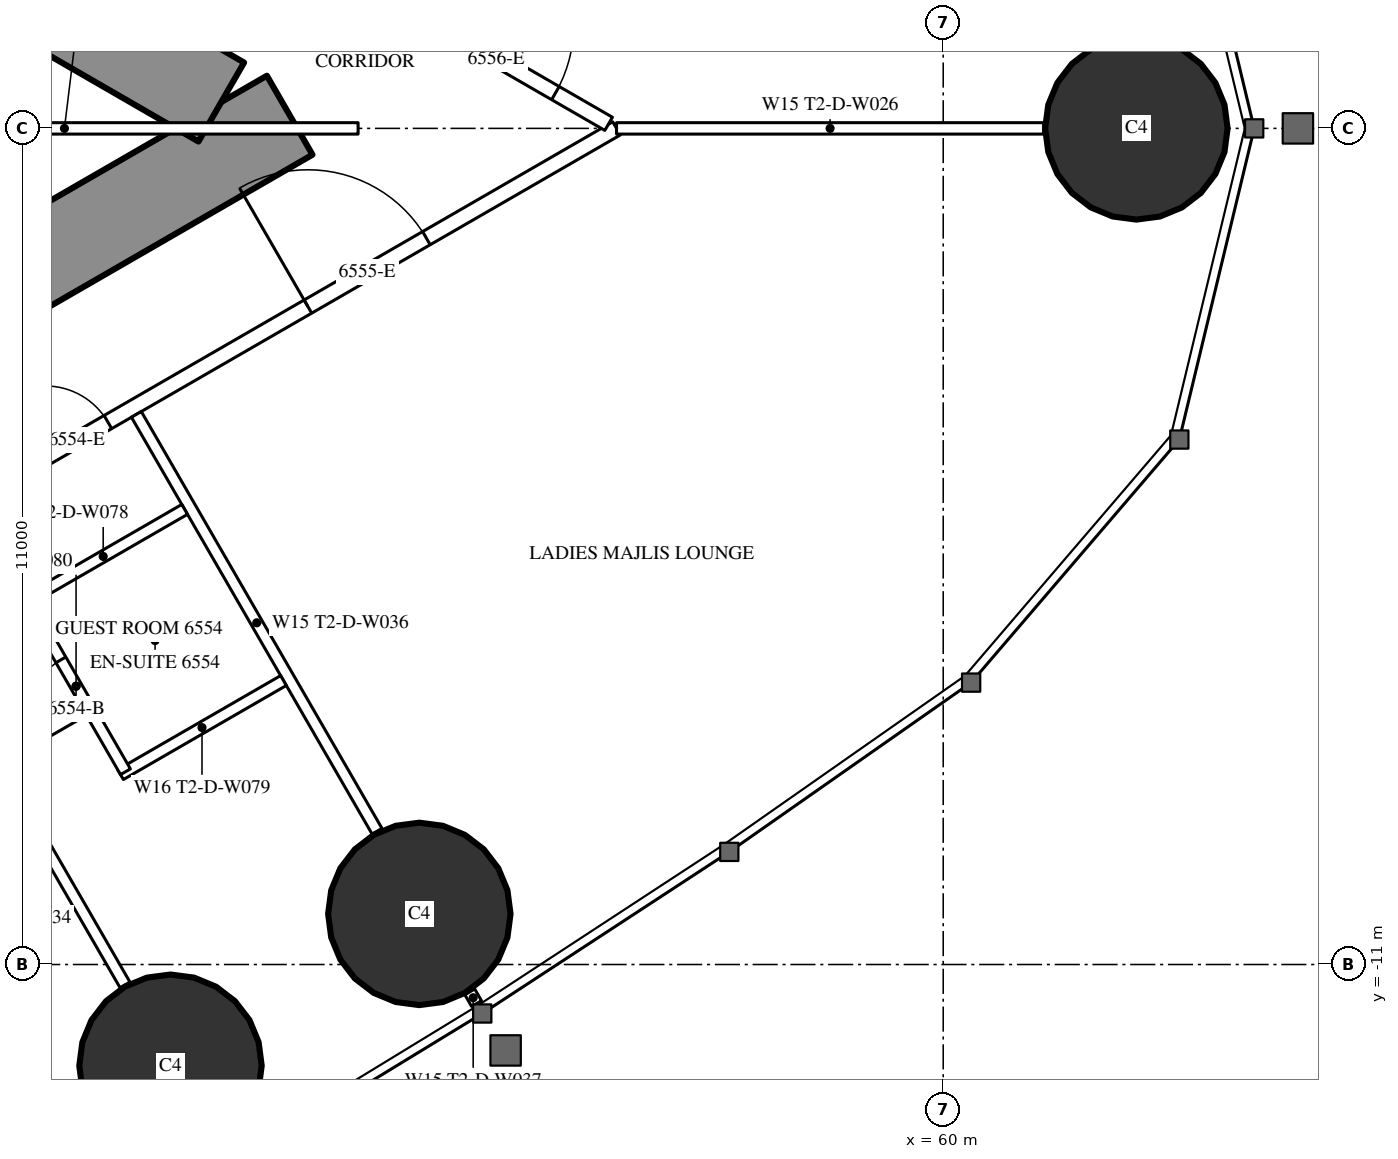
"""IFC4 building model, lengths in metres.
Left out: names, types, materials, properties, quantities, classifications, styles, units other than length and angle.
Written with IfcOpenShell. Run it as: python <this file> out.ifc"""

import sys

from ifc_helpers import new_model, si_unit, direction, frame, frame_2d, origin, origin_2d, place, context, subcontext, project, spatial, rectangle, circle, extrude, element, fill, save


model = new_model("IFC4")
c1 = context("Model", 3, precision=1e-05, world=origin(), true_north=direction((0.0, 1.0)))
c2 = subcontext(c1, "Body", "Model", "MODEL_VIEW")
j1 = project(units=[si_unit("LENGTHUNIT", "METRE"), si_unit("PLANEANGLEUNIT", "RADIAN")], contexts=[c1])
p1 = place(None, origin())
s1 = spatial("IfcSite", under=j1, at=p1, CompositionType="ELEMENT")
p2 = place(p1, origin())
s2 = spatial("IfcBuilding", under=s1, at=p2, CompositionType="ELEMENT")
p3 = place(p2, frame((0.0, 0.0, 244.1)))
s3 = spatial("IfcBuildingStorey", under=s2, at=p3, CompositionType="ELEMENT", Elevation=244.1)
for number, where, z_axis, x_axis in (
    (1, (62.542, 0.0, 0.0), (0.0, 0.0, 1.0), (1.0, 0.0, 0.0)),
    (2, (49.834, -12.332, 0.0), (0.0, 0.0, 1.0), (1.0, 0.0, 0.0)),
    (3, (53.108, -10.334, 0.0), (0.0, 0.0, 1.0), (1.0, 0.0, 0.0)),
):
    element("IfcColumn", number, at=place(p3, frame(where, z_axis=z_axis, x_axis=x_axis)), inside=s3, PredefinedType="COLUMN", context=c2, shape_type="SweptSolid", body=[
        extrude(circle(Radius=1.2, at=origin_2d()), origin(), (0.0, 0.0, 1.0), 3.6),
    ])
p4 = place(p3, frame((27.2, -13.8, 0.0), z_axis=(0.0, 0.0, 1.0), x_axis=(0.866027159892, 0.499996958321, 0.0)))
e4 = element("IfcWall", 4, at=p4, inside=s3, PredefinedType="SHEAR", context=c2, shape_type="SweptSolid", body=[
    extrude(rectangle(XDim=27.947, YDim=1.2, at=frame_2d((13.973, 0.0))), origin(), (0.0, 0.0, 1.0), 3.6),
])
p5 = place(p4, frame((4.6, 0.0, 0.0)))
e5 = element("IfcOpeningElement", 5, at=p5, cuts=e4, PredefinedType="OPENING", context=c2, shape_type="SweptSolid", body=[
    extrude(rectangle(XDim=1.0, YDim=2.2, at=frame_2d((0.5, 1.1))), frame((0.0, 0.61, 0.0), z_axis=(0.0, -1.0, 0.0), x_axis=(1.0, 0.0, 0.0)), (0.0, 0.0, 1.0), 1.22),
])
p6 = place(p4, frame((13.395, 0.0, 0.0)))
e6 = element("IfcOpeningElement", 6, at=p6, cuts=e4, PredefinedType="OPENING", context=c2, shape_type="SweptSolid", body=[
    extrude(rectangle(XDim=1.8, YDim=2.2, at=frame_2d((0.9, 1.1))), frame((0.0, 0.61, 0.0), z_axis=(0.0, -1.0, 0.0), x_axis=(1.0, 0.0, 0.0)), (0.0, 0.0, 1.0), 1.22),
])
p7 = place(p3, frame((27.2, 13.8, 0.0), z_axis=(0.0, 0.0, 1.0), x_axis=(0.866024515034, -0.500001539357, 0.0)))
e7 = element("IfcWall", 7, at=p7, inside=s3, PredefinedType="SHEAR", context=c2, shape_type="SweptSolid", body=[
    extrude(rectangle(XDim=26.907, YDim=1.2, at=frame_2d((13.454, 0.0))), origin(), (0.0, 0.0, 1.0), 3.6),
])
p8 = place(p7, frame((4.6, 0.0, 0.0)))
e8 = element("IfcOpeningElement", 8, at=p8, cuts=e7, PredefinedType="OPENING", context=c2, shape_type="SweptSolid", body=[
    extrude(rectangle(XDim=1.0, YDim=2.2, at=frame_2d((0.5, 1.1))), frame((0.0, 0.61, 0.0), z_axis=(0.0, -1.0, 0.0), x_axis=(1.0, 0.0, 0.0)), (0.0, 0.0, 1.0), 1.22),
])
p9 = place(p7, frame((13.395, 0.0, 0.0)))
e9 = element("IfcOpeningElement", 9, at=p9, cuts=e7, PredefinedType="OPENING", context=c2, shape_type="SweptSolid", body=[
    extrude(rectangle(XDim=1.8, YDim=2.2, at=frame_2d((0.9, 1.1))), frame((0.0, 0.61, 0.0), z_axis=(0.0, -1.0, 0.0), x_axis=(1.0, 0.0, 0.0)), (0.0, 0.0, 1.0), 1.22),
])
p10 = place(p3, frame((28.959, -15.44, 0.0), z_axis=(0.0, 0.0, 1.0), x_axis=(0.866025227435, 0.500000305447, 0.0)))
e10 = element("IfcWall", 10, at=p10, inside=s3, PredefinedType="PARTITIONING", context=c2, shape_type="SweptSolid", body=[
    extrude(rectangle(XDim=30.88, YDim=0.2, at=frame_2d((15.44, 0.0))), origin(), (0.0, 0.0, 1.0), 3.35),
])
p11 = place(p10, frame((1.494, 0.0, 0.0)))
e11 = element("IfcOpeningElement", 11, at=p11, cuts=e10, PredefinedType="OPENING", context=c2, shape_type="SweptSolid", body=[
    extrude(rectangle(XDim=1.8, YDim=2.04, at=frame_2d((0.9, 1.02))), frame((0.0, 0.11, 0.0), z_axis=(0.0, -1.0, 0.0), x_axis=(1.0, 0.0, 0.0)), (0.0, 0.0, 1.0), 0.22),
])
p12 = place(p10, frame((7.687, 0.0, 0.0)))
e12 = element("IfcOpeningElement", 12, at=p12, cuts=e10, PredefinedType="OPENING", context=c2, shape_type="SweptSolid", body=[
    extrude(rectangle(XDim=1.0, YDim=2.2, at=frame_2d((0.5, 1.1))), frame((0.0, 0.11, 0.0), z_axis=(0.0, -1.0, 0.0), x_axis=(1.0, 0.0, 0.0)), (0.0, 0.0, 1.0), 0.22),
])
p13 = place(p10, frame((18.321, 0.0, 0.0)))
e13 = element("IfcOpeningElement", 13, at=p13, cuts=e10, PredefinedType="OPENING", context=c2, shape_type="SweptSolid", body=[
    extrude(rectangle(XDim=0.95, YDim=2.2, at=frame_2d((0.475, 1.1))), frame((0.0, 0.11, 0.0), z_axis=(0.0, -1.0, 0.0), x_axis=(1.0, 0.0, 0.0)), (0.0, 0.0, 1.0), 0.22),
])
p14 = place(p10, frame((22.203, 0.0, 0.0)))
e14 = element("IfcOpeningElement", 14, at=p14, cuts=e10, PredefinedType="OPENING", context=c2, shape_type="SweptSolid", body=[
    extrude(rectangle(XDim=0.95, YDim=2.2, at=frame_2d((0.475, 1.1))), frame((0.0, 0.11, 0.0), z_axis=(0.0, -1.0, 0.0), x_axis=(1.0, 0.0, 0.0)), (0.0, 0.0, 1.0), 0.22),
])
p15 = place(p10, frame((26.192, 0.0, 0.0)))
e15 = element("IfcOpeningElement", 15, at=p15, cuts=e10, PredefinedType="OPENING", context=c2, shape_type="SweptSolid", body=[
    extrude(rectangle(XDim=1.8, YDim=2.2, at=frame_2d((0.9, 1.1))), frame((0.0, 0.11, 0.0), z_axis=(0.0, -1.0, 0.0), x_axis=(1.0, 0.0, 0.0)), (0.0, 0.0, 1.0), 0.22),
])
p16 = place(p3, frame((46.023, -5.704, 0.0), z_axis=(0.0, 0.0, 1.0), x_axis=(0.499984478165, -0.866034365135, 0.0)))
e16 = element("IfcWall", 16, at=p16, inside=s3, PredefinedType="PARTITIONING", context=c2, shape_type="SweptSolid", body=[
    extrude(rectangle(XDim=6.426, YDim=0.15, at=frame_2d((3.213, 0.0))), origin(), (0.0, 0.0, 1.0), 2.45),
])
p17 = place(p3, frame((49.385, -3.763, 0.0), z_axis=(0.0, 0.0, 1.0), x_axis=(0.499999447814, -0.866025722589, 0.0)))
e17 = element("IfcWall", 17, at=p17, inside=s3, PredefinedType="PARTITIONING", context=c2, shape_type="SweptSolid", body=[
    extrude(rectangle(XDim=6.333, YDim=0.15, at=frame_2d((3.166, 0.0))), origin(), (0.0, 0.0, 1.0), 2.45),
])
p18 = place(p3, frame((53.771, -11.36, 0.0), z_axis=(0.0, 0.0, 1.0), x_axis=(0.499524978789, -0.866299483762, 0.0)))
e18 = element("IfcWall", 18, at=p18, inside=s3, PredefinedType="PARTITIONING", context=c2, shape_type="SweptSolid", body=[
    extrude(rectangle(XDim=0.178, YDim=0.15, at=frame_2d((0.089, 0.0))), origin(), (0.0, 0.0, 1.0), 2.45),
])
p19 = place(p3, frame((55.702, 0.0, 0.0), z_axis=(0.0, 0.0, 1.0), x_axis=(1.0, 0.0, 0.0)))
e19 = element("IfcWall", 19, at=p19, inside=s3, PredefinedType="PARTITIONING", context=c2, shape_type="SweptSolid", body=[
    extrude(rectangle(XDim=5.619, YDim=0.15, at=frame_2d((2.81, 0.0))), origin(), (0.0, 0.0, 1.0), 2.45),
])
p20 = place(p3, frame((52.639, 1.769, 0.0), z_axis=(0.0, 0.0, 1.0), x_axis=(0.866027340901, -0.4999966448, 0.0)))
e20 = element("IfcWall", 20, at=p20, inside=s3, PredefinedType="PARTITIONING", context=c2, shape_type="SweptSolid", body=[
    extrude(rectangle(XDim=3.417, YDim=0.2, at=frame_2d((1.708, 0.0))), origin(), (0.0, 0.0, 1.0), 3.35),
])
p21 = place(p20, frame((0.809, 0.0, 0.0)))
e21 = element("IfcOpeningElement", 21, at=p21, cuts=e20, PredefinedType="OPENING", context=c2, shape_type="SweptSolid", body=[
    extrude(rectangle(XDim=1.8, YDim=2.2, at=frame_2d((0.9, 1.1))), frame((0.0, 0.11, 0.0), z_axis=(0.0, -1.0, 0.0), x_axis=(1.0, 0.0, 0.0)), (0.0, 0.0, 1.0), 0.22),
])
p22 = place(p3, frame((49.177, -8.502, 0.0), z_axis=(0.0, 0.0, 1.0), x_axis=(0.866031185235, 0.4999899861, 0.0)))
e22 = element("IfcWall", 22, at=p22, inside=s3, PredefinedType="PARTITIONING", context=c2, shape_type="SweptSolid", body=[
    extrude(rectangle(XDim=2.475, YDim=0.15, at=frame_2d((1.238, 0.0))), origin(), (0.0, 0.0, 1.0), 3.35),
])
p23 = place(p3, frame((47.942, -6.213, 0.0), z_axis=(0.0, 0.0, 1.0), x_axis=(0.500047596559, -0.865997922154, 0.0)))
e23 = element("IfcWall", 23, at=p23, inside=s3, PredefinedType="PARTITIONING", context=c2, shape_type="SweptSolid", body=[
    extrude(rectangle(XDim=2.6, YDim=0.15, at=frame_2d((1.3, 0.0))), origin(), (0.0, 0.0, 1.0), 3.35),
])
p24 = place(p23, frame((0.9, 0.0, 0.0)))
e24 = element("IfcOpeningElement", 24, at=p24, cuts=e23, PredefinedType="OPENING", context=c2, shape_type="SweptSolid", body=[
    extrude(rectangle(XDim=0.8, YDim=2.2, at=frame_2d((0.4, 1.1))), frame((0.0, 0.085, 0.0), z_axis=(0.0, -1.0, 0.0), x_axis=(1.0, 0.0, 0.0)), (0.0, 0.0, 1.0), 0.17),
])
p25 = place(p3, frame((47.877, -6.25, 0.0), z_axis=(0.0, 0.0, 1.0), x_axis=(0.866031185235, 0.4999899861, 0.0)))
e25 = element("IfcWall", 25, at=p25, inside=s3, PredefinedType="PARTITIONING", context=c2, shape_type="SweptSolid", body=[
    extrude(rectangle(XDim=2.475, YDim=0.15, at=frame_2d((1.238, 0.0))), origin(), (0.0, 0.0, 1.0), 3.35),
])
p26 = place(p3, frame((44.575, 0.0, 0.0), z_axis=(0.0, 0.0, 1.0), x_axis=(1.0, 0.0, 0.0)))
e26 = element("IfcWall", 26, at=p26, inside=s3, PredefinedType="PARTITIONING", context=c2, shape_type="SweptSolid", body=[
    extrude(rectangle(XDim=7.727, YDim=0.15, at=frame_2d((3.864, 0.0))), origin(), (0.0, 0.0, 1.0), 2.45),
])
p27 = place(p24, origin())
e27 = element("IfcDoor", 27, at=p27, inside=s3, OperationType="SINGLE_SWING_RIGHT", PredefinedType="DOOR", context=c2, shape_type="SweptSolid", body=[
    extrude(rectangle(XDim=0.8, YDim=2.2, at=frame_2d((0.4, 1.1))), frame((0.0, 0.025, 0.0), z_axis=(0.0, -1.0, 0.0), x_axis=(1.0, 0.0, 0.0)), (0.0, 0.0, 1.0), 0.05),
])
fill(e24, e27)
p28 = place(p14, origin())
e28 = element("IfcDoor", 28, at=p28, inside=s3, OperationType="SINGLE_SWING_LEFT", PredefinedType="DOOR", context=c2, shape_type="SweptSolid", body=[
    extrude(rectangle(XDim=0.95, YDim=2.2, at=frame_2d((0.475, 1.1))), frame((0.0, 0.025, 0.0), z_axis=(0.0, -1.0, 0.0), x_axis=(1.0, 0.0, 0.0)), (0.0, 0.0, 1.0), 0.05),
])
fill(e14, e28)
p29 = place(p15, origin())
e29 = element("IfcDoor", 29, at=p29, inside=s3, OperationType="DOUBLE_DOOR_SINGLE_SWING", PredefinedType="DOOR", context=c2, shape_type="SweptSolid", body=[
    extrude(rectangle(XDim=1.8, YDim=2.2, at=frame_2d((0.9, 1.1))), frame((0.0, 0.025, 0.0), z_axis=(0.0, -1.0, 0.0), x_axis=(1.0, 0.0, 0.0)), (0.0, 0.0, 1.0), 0.05),
])
fill(e15, e29)
p30 = place(p21, origin())
e30 = element("IfcDoor", 30, at=p30, inside=s3, OperationType="DOUBLE_DOOR_SINGLE_SWING", PredefinedType="DOOR", context=c2, shape_type="SweptSolid", body=[
    extrude(rectangle(XDim=1.8, YDim=2.2, at=frame_2d((0.9, 1.1))), frame((0.0, 0.025, 0.0), z_axis=(0.0, -1.0, 0.0), x_axis=(1.0, 0.0, 0.0)), (0.0, 0.0, 1.0), 0.05),
])
fill(e21, e30)
save(model, sys.argv[1])
